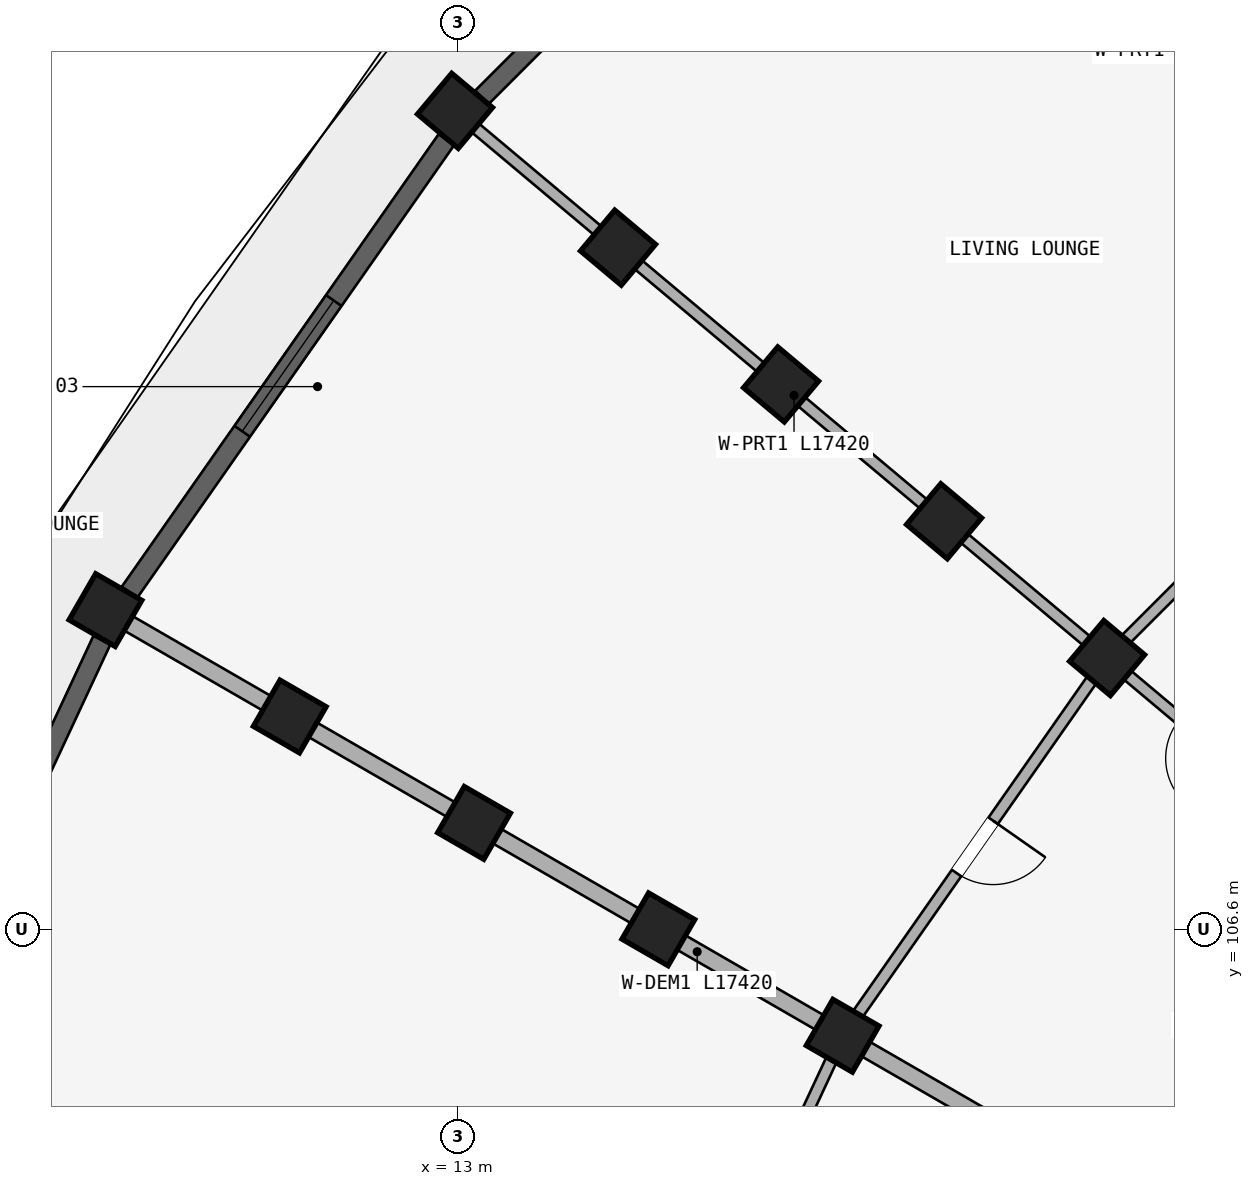
"""IFC4 building model, lengths in metres.
Left out: names, types, materials, properties, quantities, classifications, styles, units other than length and angle.
Written with IfcOpenShell. Run it as: python <this file> out.ifc"""

import sys

from ifc_helpers import new_model, si_unit, direction, frame, frame_2d, origin, origin_2d, place, context, subcontext, project, spatial, rectangle, extrude, element, fill, save


model = new_model("IFC4")
c1 = context("Model", 3, precision=1e-05, world=origin(), true_north=direction((0.0, 1.0)))
c2 = subcontext(c1, "Body", "Model", "MODEL_VIEW")
j1 = project(units=[si_unit("LENGTHUNIT", "METRE"), si_unit("PLANEANGLEUNIT", "RADIAN")], contexts=[c1])
p1 = place(None, origin())
s1 = spatial("IfcSite", under=j1, at=p1, CompositionType="ELEMENT")
p2 = place(p1, origin())
s2 = spatial("IfcBuilding", under=s1, at=p2, CompositionType="ELEMENT")
p3 = place(p2, frame((0.0, 0.0, 18.15)))
s3 = spatial("IfcBuildingStorey", under=s2, at=p3, CompositionType="ELEMENT", Elevation=18.15)
for number, where, z_axis, x_axis in (
    (1, (21.542, 110.169, 0.0), (0.0, 0.0, 1.0), (0.643, 0.766, 0.0)),
    (2, (19.397, 111.969, 0.0), (0.0, 0.0, 1.0), (0.643, 0.766, 0.0)),
    (3, (17.252, 113.769, 0.0), (0.0, 0.0, 1.0), (0.643, 0.766, 0.0)),
    (4, (15.107, 115.568, 0.0), (0.0, 0.0, 1.0), (0.643, 0.766, 0.0)),
    (5, (12.962, 117.368, 0.0), (0.0, 0.0, 1.0), (0.643, 0.766, 0.0)),
    (6, (18.062, 105.2, 0.0), (0.0, 0.0, 1.0), (0.5, 0.866, 0.0)),
    (7, (15.637, 106.6, 0.0), (0.0, 0.0, 1.0), (0.5, 0.866, 0.0)),
    (8, (13.213, 108.0, 0.0), (0.0, 0.0, 1.0), (0.5, 0.866, 0.0)),
    (9, (10.788, 109.4, 0.0), (0.0, 0.0, 1.0), (0.5, 0.866, 0.0)),
    (10, (8.363, 110.8, 0.0), (0.0, 0.0, 1.0), (0.5, 0.866, 0.0)),
):
    element("IfcColumn", number, at=place(p3, frame(where, z_axis=z_axis, x_axis=x_axis)), inside=s3, PredefinedType="COLUMN", context=c2, shape_type="SweptSolid", body=[
        extrude(rectangle(XDim=0.7, YDim=0.7, at=origin_2d()), origin(), (0.0, 0.0, 1.0), 2.93),
    ])
p4 = place(p3, frame((30.009, 109.479, 0.0), z_axis=(0.0, 0.0, 1.0), x_axis=(-0.642784757967, 0.766046835987, 0.0)))
e11 = element("IfcWall", 11, at=p4, inside=s3, PredefinedType="PARTITIONING", context=c2, shape_type="SweptSolid", body=[
    extrude(rectangle(XDim=17.42, YDim=0.15, at=frame_2d((8.71, 0.0))), origin(), (0.0, 0.0, 1.0), 2.372),
])
p5 = place(p4, frame((4.45, 0.0, 0.0)))
e12 = element("IfcOpeningElement", 12, at=p5, cuts=e11, PredefinedType="OPENING", context=c2, shape_type="SweptSolid", body=[
    extrude(rectangle(XDim=0.8, YDim=2.1, at=frame_2d((0.4, 1.05))), frame((0.0, 0.085, 0.0), z_axis=(0.0, -1.0, 0.0), x_axis=(1.0, 0.0, 0.0)), (0.0, 0.0, 1.0), 0.17),
])
p6 = place(p3, frame((26.521, 105.991, 0.0), z_axis=(0.0, 0.0, 1.0), x_axis=(-0.766046835987, 0.642784757967, 0.0)))
e13 = element("IfcWall", 13, at=p6, inside=s3, PredefinedType="PARTITIONING", context=c2, shape_type="SweptSolid", body=[
    extrude(rectangle(XDim=17.42, YDim=0.15, at=frame_2d((8.71, 0.0))), origin(), (0.0, 0.0, 1.0), 2.372),
])
p7 = place(p6, frame((4.45, 0.0, 0.0)))
e14 = element("IfcOpeningElement", 14, at=p7, cuts=e13, PredefinedType="OPENING", context=c2, shape_type="SweptSolid", body=[
    extrude(rectangle(XDim=0.8, YDim=2.1, at=frame_2d((0.4, 1.05))), frame((0.0, 0.085, 0.0), z_axis=(0.0, -1.0, 0.0), x_axis=(1.0, 0.0, 0.0)), (0.0, 0.0, 1.0), 0.17),
])
p8 = place(p3, frame((23.691, 101.95, 0.0), z_axis=(0.0, 0.0, 1.0), x_axis=(-0.866026648973, 0.499997843263, 0.0)))
e15 = element("IfcWall", 15, at=p8, inside=s3, PredefinedType="STANDARD", context=c2, shape_type="SweptSolid", body=[
    extrude(rectangle(XDim=17.42, YDim=0.22, at=frame_2d((8.71, 0.0))), origin(), (0.0, 0.0, 1.0), 2.372),
])
p9 = place(p3, frame((25.831, 114.458, 0.0), z_axis=(0.0, 0.0, 1.0), x_axis=(-0.707106781187, -0.707106781187, 0.0)))
e16 = element("IfcWall", 16, at=p9, inside=s3, PredefinedType="PLUMBINGWALL", context=c2, shape_type="SweptSolid", body=[
    extrude(rectangle(XDim=6.066, YDim=0.15, at=frame_2d((3.033, 0.0))), origin(), (0.0, 0.0, 1.0), 2.372),
])
p10 = place(p9, frame((2.633, 0.0, 0.0)))
e17 = element("IfcOpeningElement", 17, at=p10, cuts=e16, PredefinedType="OPENING", context=c2, shape_type="SweptSolid", body=[
    extrude(rectangle(XDim=0.8, YDim=2.1, at=frame_2d((0.4, 1.05))), frame((0.0, 0.085, 0.0), z_axis=(0.0, -1.0, 0.0), x_axis=(1.0, 0.0, 0.0)), (0.0, 0.0, 1.0), 0.17),
])
p11 = place(p3, frame((21.542, 110.169, 0.0), z_axis=(0.0, 0.0, 1.0), x_axis=(-0.573594691504, -0.81913926159, 0.0)))
e18 = element("IfcWall", 18, at=p11, inside=s3, PredefinedType="PLUMBINGWALL", context=c2, shape_type="SweptSolid", body=[
    extrude(rectangle(XDim=6.066, YDim=0.15, at=frame_2d((3.033, 0.0))), origin(), (0.0, 0.0, 1.0), 2.372),
])
p12 = place(p11, frame((2.613, 0.0, 0.0)))
e19 = element("IfcOpeningElement", 19, at=p12, cuts=e18, PredefinedType="OPENING", context=c2, shape_type="SweptSolid", body=[
    extrude(rectangle(XDim=0.84, YDim=2.1, at=frame_2d((0.42, 1.05))), frame((0.0, 0.085, 0.0), z_axis=(0.0, -1.0, 0.0), x_axis=(1.0, 0.0, 0.0)), (0.0, 0.0, 1.0), 0.17),
])
p13 = place(p3, frame((18.062, 105.2, 0.0), z_axis=(0.0, 0.0, 1.0), x_axis=(-0.42260781991, -0.906312656069, 0.0)))
e20 = element("IfcWall", 20, at=p13, inside=s3, PredefinedType="PLUMBINGWALL", context=c2, shape_type="SweptSolid", body=[
    extrude(rectangle(XDim=6.066, YDim=0.15, at=frame_2d((3.033, 0.0))), origin(), (0.0, 0.0, 1.0), 2.372),
])
p14 = place(p13, frame((2.653, 0.0, 0.0)))
e21 = element("IfcOpeningElement", 21, at=p14, cuts=e20, PredefinedType="OPENING", context=c2, shape_type="SweptSolid", body=[
    extrude(rectangle(XDim=0.76, YDim=2.05, at=frame_2d((0.38, 1.025))), frame((0.0, 0.085, 0.0), z_axis=(0.0, -1.0, 0.0), x_axis=(1.0, 0.0, 0.0)), (0.0, 0.0, 1.0), 0.17),
])
p15 = place(p3, frame((18.454, 122.684, 0.0), z_axis=(0.0, 0.0, 1.0), x_axis=(-0.707106781187, -0.707106781187, 0.0)))
e22 = element("IfcWall", 22, at=p15, inside=s3, PredefinedType="STANDARD", context=c2, shape_type="SweptSolid", body=[
    extrude(rectangle(XDim=7.267, YDim=0.25, at=frame_2d((3.633, 0.0))), origin(), (0.0, 0.0, 1.0), 2.372),
])
p16 = place(p15, frame((4.766, 0.0, 0.522)))
e23 = element("IfcOpeningElement", 23, at=p16, cuts=e22, PredefinedType="OPENING", context=c2, shape_type="SweptSolid", body=[
    extrude(rectangle(XDim=1.2, YDim=1.5, at=frame_2d((0.6, 0.75))), frame((0.0, 0.135, 0.0), z_axis=(0.0, -1.0, 0.0), x_axis=(1.0, 0.0, 0.0)), (0.0, 0.0, 1.0), 0.27),
])
p17 = place(p15, frame((1.943, 0.0, 0.0)))
e24 = element("IfcOpeningElement", 24, at=p17, cuts=e22, PredefinedType="OPENING", context=c2, shape_type="SweptSolid", body=[
    extrude(rectangle(XDim=1.2, YDim=2.15, at=frame_2d((0.6, 1.075))), frame((0.0, 0.135, 0.0), z_axis=(0.0, -1.0, 0.0), x_axis=(1.0, 0.0, 0.0)), (0.0, 0.0, 1.0), 0.27),
])
p18 = place(p3, frame((12.849, 116.989, 0.0), z_axis=(0.0, 0.0, 1.0), x_axis=(-0.573566061701, -0.819159308599, 0.0)))
e25 = element("IfcWall", 25, at=p18, inside=s3, PredefinedType="STANDARD", context=c2, shape_type="SweptSolid", body=[
    extrude(rectangle(XDim=7.267, YDim=0.25, at=frame_2d((3.633, 0.0))), origin(), (0.0, 0.0, 1.0), 2.372),
])
p19 = place(p18, frame((2.583, 0.0, 0.372)))
e26 = element("IfcOpeningElement", 26, at=p19, cuts=e25, PredefinedType="OPENING", context=c2, shape_type="SweptSolid", body=[
    extrude(rectangle(XDim=2.1, YDim=1.8, at=frame_2d((1.05, 0.9))), frame((0.0, 0.135, 0.0), z_axis=(0.0, -1.0, 0.0), x_axis=(1.0, 0.0, 0.0)), (0.0, 0.0, 1.0), 0.27),
])
p20 = place(p3, frame((8.317, 110.406, 0.0), z_axis=(0.0, 0.0, 1.0), x_axis=(-0.422627946127, -0.90630327107, 0.0)))
e27 = element("IfcWall", 27, at=p20, inside=s3, PredefinedType="STANDARD", context=c2, shape_type="SweptSolid", body=[
    extrude(rectangle(XDim=7.267, YDim=0.25, at=frame_2d((3.633, 0.0))), origin(), (0.0, 0.0, 1.0), 2.372),
])
p21 = place(p20, frame((2.658, 0.0, 0.322)))
e28 = element("IfcOpeningElement", 28, at=p21, cuts=e27, PredefinedType="OPENING", context=c2, shape_type="SweptSolid", body=[
    extrude(rectangle(XDim=1.95, YDim=1.85, at=frame_2d((0.975, 0.925))), frame((0.0, 0.135, 0.0), z_axis=(0.0, -1.0, 0.0), x_axis=(1.0, 0.0, 0.0)), (0.0, 0.0, 1.0), 0.27),
])
p22 = place(p19, origin())
e29 = element("IfcWindow", 29, at=p22, inside=s3, PartitioningType="TRIPLE_PANEL_VERTICAL", PredefinedType="WINDOW", context=c2, shape_type="SweptSolid", body=[
    extrude(rectangle(XDim=2.1, YDim=1.8, at=frame_2d((1.05, 0.9))), frame((0.0, 0.03, 0.0), z_axis=(0.0, -1.0, 0.0), x_axis=(1.0, 0.0, 0.0)), (0.0, 0.0, 1.0), 0.06),
])
fill(e26, e29)
p23 = place(p12, frame((0.84, 0.0, 0.0), z_axis=(0.0, 0.0, 1.0), x_axis=(-1.0, 0.0, 0.0)))
e30 = element("IfcDoor", 30, at=p23, inside=s3, OperationType="SINGLE_SWING_RIGHT", PredefinedType="DOOR", context=c2, shape_type="SweptSolid", body=[
    extrude(rectangle(XDim=0.84, YDim=2.1, at=frame_2d((0.42, 1.05))), frame((0.0, 0.025, 0.0), z_axis=(0.0, -1.0, 0.0), x_axis=(1.0, 0.0, 0.0)), (0.0, 0.0, 1.0), 0.05),
])
fill(e19, e30)
save(model, sys.argv[1])
